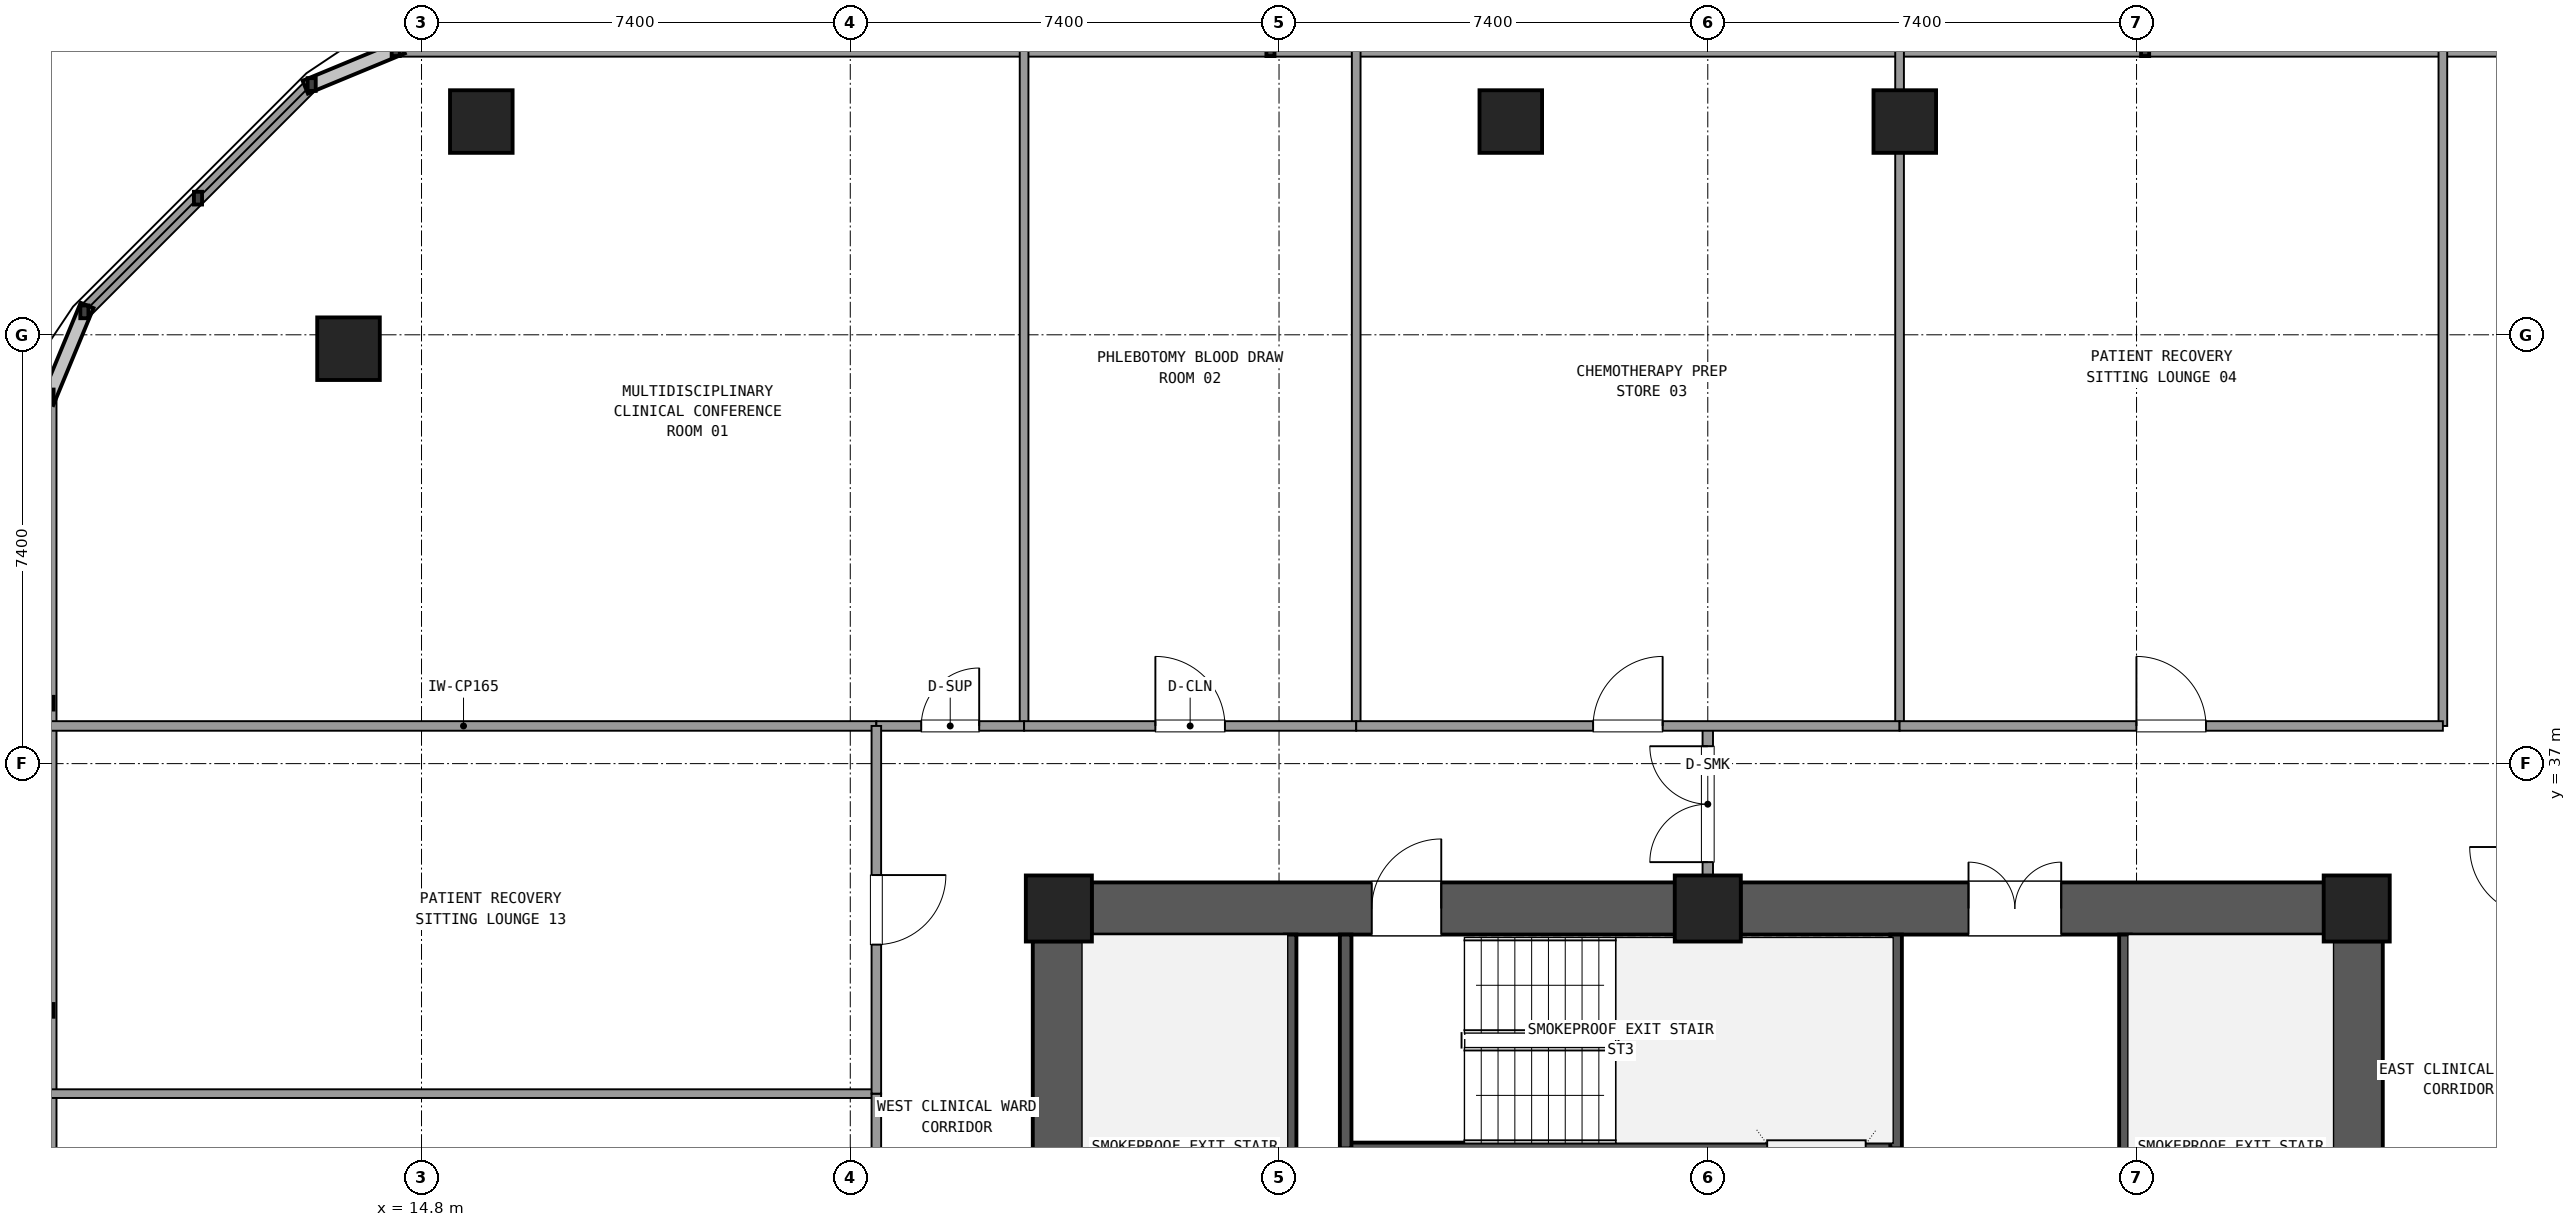
"""IFC4 building model, lengths in metres.
Left out: names, types, materials, properties, quantities, classifications, styles, units other than length and angle.
Written with IfcOpenShell. Run it as: python <this file> out.ifc"""

import sys

from ifc_helpers import new_model, si_unit, direction, frame, frame_2d, origin, origin_2d, place, context, subcontext, project, spatial, rectangle, extrude, element, fill, save


model = new_model("IFC4")
c1 = context("Model", 3, precision=1e-05, world=origin(), true_north=direction((0.0, 1.0)))
c2 = subcontext(c1, "Body", "Model", "MODEL_VIEW")
j1 = project(units=[si_unit("LENGTHUNIT", "METRE"), si_unit("PLANEANGLEUNIT", "RADIAN")], contexts=[c1])
p1 = place(None, origin())
s1 = spatial("IfcSite", under=j1, at=p1, CompositionType="ELEMENT")
p2 = place(p1, origin())
s2 = spatial("IfcBuilding", under=s1, at=p2, CompositionType="ELEMENT")
p3 = place(p2, frame((0.0, 0.0, 56.34)))
s3 = spatial("IfcBuildingStorey", under=s2, at=p3, CompositionType="ELEMENT", Elevation=56.34)
for number, where, z_axis, x_axis in (
    (1, (48.2, 34.5, 0.0), (0.0, 0.0, 1.0), (1.0, 0.0, 0.0)),
    (2, (37.0, 34.5, 0.0), (0.0, 0.0, 1.0), (1.0, 0.0, 0.0)),
    (3, (25.8, 34.5, 0.0), (0.0, 0.0, 1.0), (1.0, 0.0, 0.0)),
):
    element("IfcColumn", number, at=place(p3, frame(where, z_axis=z_axis, x_axis=x_axis)), inside=s3, PredefinedType="COLUMN", context=c2, shape_type="SweptSolid", body=[
        extrude(rectangle(XDim=1.14, YDim=1.14, at=origin_2d()), origin(), (0.0, 0.0, 1.0), 3.6),
    ])
p4 = place(p3, frame((48.2, 26.465, 0.0), z_axis=(0.0, 0.0, 1.0), x_axis=(0.0, 1.0, 0.0)))
e4 = element("IfcWall", 4, at=p4, inside=s3, PredefinedType="SHEAR", context=c2, shape_type="SweptSolid", body=[
    extrude(rectangle(XDim=7.47, YDim=0.9, at=frame_2d((3.735, 0.0))), origin(), (0.0, 0.0, 1.0), 3.32),
])
p5 = place(p3, frame((47.635, 34.5, 0.0), z_axis=(0.0, 0.0, 1.0), x_axis=(-1.0, 0.0, 0.0)))
e5 = element("IfcWall", 5, at=p5, inside=s3, PredefinedType="SHEAR", context=c2, shape_type="SweptSolid", body=[
    extrude(rectangle(XDim=10.07, YDim=0.9, at=frame_2d((5.035, 0.0))), origin(), (0.0, 0.0, 1.0), 3.32),
])
p6 = place(p5, frame((4.535, 0.0, 0.0)))
e6 = element("IfcOpeningElement", 6, at=p6, cuts=e5, PredefinedType="OPENING", context=c2, shape_type="SweptSolid", body=[
    extrude(rectangle(XDim=1.6, YDim=2.2, at=frame_2d((0.8, 1.1))), frame((0.0, 0.46, 0.0), z_axis=(0.0, -1.0, 0.0), x_axis=(1.0, 0.0, 0.0)), (0.0, 0.0, 1.0), 0.92),
])
p7 = place(p3, frame((36.435, 34.5, 0.0), z_axis=(0.0, 0.0, 1.0), x_axis=(-1.0, 0.0, 0.0)))
e7 = element("IfcWall", 7, at=p7, inside=s3, PredefinedType="SHEAR", context=c2, shape_type="SweptSolid", body=[
    extrude(rectangle(XDim=10.07, YDim=0.9, at=frame_2d((5.035, 0.0))), origin(), (0.0, 0.0, 1.0), 3.32),
])
p8 = place(p7, frame((4.035, 0.0, 0.0)))
e8 = element("IfcOpeningElement", 8, at=p8, cuts=e7, PredefinedType="OPENING", context=c2, shape_type="SweptSolid", body=[
    extrude(rectangle(XDim=1.2, YDim=2.15, at=frame_2d((0.6, 1.075))), frame((0.0, 0.46, 0.0), z_axis=(0.0, -1.0, 0.0), x_axis=(1.0, 0.0, 0.0)), (0.0, 0.0, 1.0), 0.92),
])
p9 = place(p3, frame((25.8, 33.935, 0.0), z_axis=(0.0, 0.0, 1.0), x_axis=(0.0, -1.0, 0.0)))
e9 = element("IfcWall", 9, at=p9, inside=s3, PredefinedType="SHEAR", context=c2, shape_type="SweptSolid", body=[
    extrude(rectangle(XDim=7.47, YDim=0.9, at=frame_2d((3.735, 0.0))), origin(), (0.0, 0.0, 1.0), 3.32),
])
for number, where, z_axis, x_axis in (
    (10, (40.4, 48.08, 0.0), (0.0, 0.0, 1.0), (1.0, 0.0, 0.0)),
    (11, (33.6, 48.08, 0.0), (0.0, 0.0, 1.0), (1.0, 0.0, 0.0)),
    (12, (15.832, 48.08, 0.0), (0.0, 0.0, 1.0), (1.0, 0.0, 0.0)),
    (13, (13.54, 44.16, 0.0), (0.0, 0.0, 1.0), (1.0, 0.0, 0.0)),
):
    element("IfcColumn", number, at=place(p3, frame(where, z_axis=z_axis, x_axis=x_axis)), inside=s3, PredefinedType="COLUMN", context=c2, shape_type="SweptSolid", body=[
        extrude(rectangle(XDim=1.08, YDim=1.08, at=origin_2d()), origin(), (0.0, 0.0, 1.0), 3.6),
    ])
p10 = place(p3, frame((59.645, 49.32, 0.0), z_axis=(0.0, 0.0, 1.0), x_axis=(-1.0, 0.0, 0.0)))
e14 = element("IfcWall", 14, at=p10, inside=s3, PredefinedType="SOLIDWALL", context=c2, shape_type="SweptSolid", body=[
    extrude(rectangle(XDim=45.29, YDim=0.24, at=frame_2d((22.645, 0.0))), origin(), (0.0, 0.0, 1.0), 0.85),
])
p11 = place(p3, frame((12.904, 48.719, 0.0), z_axis=(0.0, 0.0, 1.0), x_axis=(-0.707106781187, -0.707106781187, 0.0)))
e15 = element("IfcWall", 15, at=p11, inside=s3, PredefinedType="SOLIDWALL", context=c2, shape_type="SweptSolid", body=[
    extrude(rectangle(XDim=5.548, YDim=0.24, at=frame_2d((2.774, 0.0))), origin(), (0.0, 0.0, 1.0), 0.85),
])
p12 = place(p3, frame((8.38, 43.345, 0.0), z_axis=(0.0, 0.0, 1.0), x_axis=(0.0, -1.0, 0.0)))
e16 = element("IfcWall", 16, at=p12, inside=s3, PredefinedType="SOLIDWALL", context=c2, shape_type="SweptSolid", body=[
    extrude(rectangle(XDim=15.905, YDim=0.24, at=frame_2d((7.953, 0.0))), origin(), (0.0, 0.0, 1.0), 0.85),
])
for number, where, z_axis, x_axis in (
    (17, (29.8, 24.65, 0.0), (0.0, 0.0, 1.0), (0.0, 1.0, 0.0)),
    (18, (44.2, 24.65, 0.0), (0.0, 0.0, 1.0), (0.0, 1.0, 0.0)),
):
    element("IfcWall", number, at=place(p3, frame(where, z_axis=z_axis, x_axis=x_axis)), inside=s3, PredefinedType="SHEAR", context=c2, shape_type="SweptSolid", body=[
        extrude(rectangle(XDim=9.4, YDim=0.2, at=frame_2d((4.7, 0.0))), origin(), (0.0, 0.0, 1.0), 3.32),
    ])
p13 = place(p3, frame((30.75, 30.36, 0.0), z_axis=(0.0, 0.0, 1.0), x_axis=(1.0, 0.0, 0.0)))
e19 = element("IfcWall", 19, at=p13, inside=s3, PredefinedType="SHEAR", context=c2, shape_type="SweptSolid", body=[
    extrude(rectangle(XDim=9.5, YDim=0.2, at=frame_2d((4.75, 0.0))), origin(), (0.0, 0.0, 1.0), 3.32),
])
for number, where, z_axis, x_axis in (
    (20, (30.75, 30.36, 0.0), (0.0, 0.0, 1.0), (0.0, 1.0, 0.0)),
    (21, (40.25, 30.36, 0.0), (0.0, 0.0, 1.0), (0.0, 1.0, 0.0)),
):
    element("IfcWall", number, at=place(p3, frame(where, z_axis=z_axis, x_axis=x_axis)), inside=s3, PredefinedType="SHEAR", context=c2, shape_type="SweptSolid", body=[
        extrude(rectangle(XDim=3.69, YDim=0.2, at=frame_2d((1.845, 0.0))), origin(), (0.0, 0.0, 1.0), 3.32),
    ])
p14 = place(p3, frame((37.0, 34.95, 0.0), z_axis=(0.0, 0.0, 1.0), x_axis=(0.0, 1.0, 0.0)))
e22 = element("IfcWall", 22, at=p14, inside=s3, PredefinedType="PARTITIONING", context=c2, shape_type="SweptSolid", body=[
    extrude(rectangle(XDim=2.7, YDim=0.18, at=frame_2d((1.35, 0.0))), origin(), (0.0, 0.0, 1.0), 2.61),
])
p15 = place(p14, frame((0.35, 0.0, 0.0)))
e23 = element("IfcOpeningElement", 23, at=p15, cuts=e22, PredefinedType="OPENING", context=c2, shape_type="SweptSolid", body=[
    extrude(rectangle(XDim=2.0, YDim=2.2, at=frame_2d((1.0, 1.1))), frame((0.0, 0.1, 0.0), z_axis=(0.0, -1.0, 0.0), x_axis=(1.0, 0.0, 0.0)), (0.0, 0.0, 1.0), 0.2),
])
p16 = place(p3, frame((8.4, 37.65, 0.0), z_axis=(0.0, 0.0, 1.0), x_axis=(1.0, 0.0, 0.0)))
e24 = element("IfcWall", 24, at=p16, inside=s3, PredefinedType="PARTITIONING", context=c2, shape_type="SweptSolid", body=[
    extrude(rectangle(XDim=14.25, YDim=0.165, at=frame_2d((7.125, 0.0))), origin(), (0.0, 0.0, 1.0), 2.61),
])
p17 = place(p3, frame((25.2, 37.65, 0.0), z_axis=(0.0, 0.0, 1.0), x_axis=(0.0, 1.0, 0.0)))
e25 = element("IfcWall", 25, at=p17, inside=s3, PredefinedType="PARTITIONING", context=c2, shape_type="SweptSolid", body=[
    extrude(rectangle(XDim=11.65, YDim=0.15, at=frame_2d((5.825, 0.0))), origin(), (0.0, 0.0, 1.0), 2.61),
])
p18 = place(p3, frame((22.65, 37.65, 0.0), z_axis=(0.0, 0.0, 1.0), x_axis=(1.0, 0.0, 0.0)))
e26 = element("IfcWall", 26, at=p18, inside=s3, PredefinedType="PARTITIONING", context=c2, shape_type="SweptSolid", body=[
    extrude(rectangle(XDim=2.55, YDim=0.165, at=frame_2d((1.275, 0.0))), origin(), (0.0, 0.0, 1.0), 2.61),
])
p19 = place(p18, frame((0.775, 0.0, 0.0)))
e27 = element("IfcOpeningElement", 27, at=p19, cuts=e26, PredefinedType="OPENING", context=c2, shape_type="SweptSolid", body=[
    extrude(rectangle(XDim=1.0, YDim=2.15, at=frame_2d((0.5, 1.075))), frame((0.0, 0.093, 0.0), z_axis=(0.0, -1.0, 0.0), x_axis=(1.0, 0.0, 0.0)), (0.0, 0.0, 1.0), 0.185),
])
p20 = place(p3, frame((30.932, 37.65, 0.0), z_axis=(0.0, 0.0, 1.0), x_axis=(0.0, 1.0, 0.0)))
e28 = element("IfcWall", 28, at=p20, inside=s3, PredefinedType="PARTITIONING", context=c2, shape_type="SweptSolid", body=[
    extrude(rectangle(XDim=11.65, YDim=0.15, at=frame_2d((5.825, 0.0))), origin(), (0.0, 0.0, 1.0), 2.61),
])
p21 = place(p3, frame((25.2, 37.65, 0.0), z_axis=(0.0, 0.0, 1.0), x_axis=(1.0, 0.0, 0.0)))
e29 = element("IfcWall", 29, at=p21, inside=s3, PredefinedType="PARTITIONING", context=c2, shape_type="SweptSolid", body=[
    extrude(rectangle(XDim=5.732, YDim=0.165, at=frame_2d((2.866, 0.0))), origin(), (0.0, 0.0, 1.0), 2.61),
])
p22 = place(p21, frame((2.266, 0.0, 0.0)))
e30 = element("IfcOpeningElement", 30, at=p22, cuts=e29, PredefinedType="OPENING", context=c2, shape_type="SweptSolid", body=[
    extrude(rectangle(XDim=1.2, YDim=2.15, at=frame_2d((0.6, 1.075))), frame((0.0, 0.093, 0.0), z_axis=(0.0, -1.0, 0.0), x_axis=(1.0, 0.0, 0.0)), (0.0, 0.0, 1.0), 0.185),
])
p23 = place(p3, frame((40.31, 37.65, 0.0), z_axis=(0.0, 0.0, 1.0), x_axis=(0.0, 1.0, 0.0)))
e31 = element("IfcWall", 31, at=p23, inside=s3, PredefinedType="PARTITIONING", context=c2, shape_type="SweptSolid", body=[
    extrude(rectangle(XDim=11.65, YDim=0.15, at=frame_2d((5.825, 0.0))), origin(), (0.0, 0.0, 1.0), 2.61),
])
p24 = place(p3, frame((30.932, 37.65, 0.0), z_axis=(0.0, 0.0, 1.0), x_axis=(1.0, 0.0, 0.0)))
e32 = element("IfcWall", 32, at=p24, inside=s3, PredefinedType="PARTITIONING", context=c2, shape_type="SweptSolid", body=[
    extrude(rectangle(XDim=9.378, YDim=0.165, at=frame_2d((4.689, 0.0))), origin(), (0.0, 0.0, 1.0), 2.61),
])
p25 = place(p24, frame((4.089, 0.0, 0.0)))
e33 = element("IfcOpeningElement", 33, at=p25, cuts=e32, PredefinedType="OPENING", context=c2, shape_type="SweptSolid", body=[
    extrude(rectangle(XDim=1.2, YDim=2.15, at=frame_2d((0.6, 1.075))), frame((0.0, 0.093, 0.0), z_axis=(0.0, -1.0, 0.0), x_axis=(1.0, 0.0, 0.0)), (0.0, 0.0, 1.0), 0.185),
])
p26 = place(p3, frame((49.687, 37.65, 0.0), z_axis=(0.0, 0.0, 1.0), x_axis=(0.0, 1.0, 0.0)))
e34 = element("IfcWall", 34, at=p26, inside=s3, PredefinedType="PARTITIONING", context=c2, shape_type="SweptSolid", body=[
    extrude(rectangle(XDim=11.65, YDim=0.15, at=frame_2d((5.825, 0.0))), origin(), (0.0, 0.0, 1.0), 2.61),
])
p27 = place(p3, frame((40.31, 37.65, 0.0), z_axis=(0.0, 0.0, 1.0), x_axis=(1.0, 0.0, 0.0)))
e35 = element("IfcWall", 35, at=p27, inside=s3, PredefinedType="PARTITIONING", context=c2, shape_type="SweptSolid", body=[
    extrude(rectangle(XDim=9.377, YDim=0.165, at=frame_2d((4.688, 0.0))), origin(), (0.0, 0.0, 1.0), 2.61),
])
p28 = place(p27, frame((4.088, 0.0, 0.0)))
e36 = element("IfcOpeningElement", 36, at=p28, cuts=e35, PredefinedType="OPENING", context=c2, shape_type="SweptSolid", body=[
    extrude(rectangle(XDim=1.2, YDim=2.15, at=frame_2d((0.6, 1.075))), frame((0.0, 0.093, 0.0), z_axis=(0.0, -1.0, 0.0), x_axis=(1.0, 0.0, 0.0)), (0.0, 0.0, 1.0), 0.185),
])
p29 = place(p3, frame((22.65, 31.305, 0.0), z_axis=(0.0, 0.0, 1.0), x_axis=(-1.0, 0.0, 0.0)))
e37 = element("IfcWall", 37, at=p29, inside=s3, PredefinedType="PARTITIONING", context=c2, shape_type="SweptSolid", body=[
    extrude(rectangle(XDim=14.25, YDim=0.15, at=frame_2d((7.125, 0.0))), origin(), (0.0, 0.0, 1.0), 2.61),
])
p30 = place(p3, frame((22.65, 23.315, 0.0), z_axis=(0.0, 0.0, 1.0), x_axis=(0.0, 1.0, 0.0)))
e38 = element("IfcWall", 38, at=p30, inside=s3, PredefinedType="PARTITIONING", context=c2, shape_type="SweptSolid", body=[
    extrude(rectangle(XDim=7.99, YDim=0.165, at=frame_2d((3.995, 0.0))), origin(), (0.0, 0.0, 1.0), 2.61),
])
p31 = place(p30, frame((3.395, 0.0, 0.0)))
e39 = element("IfcOpeningElement", 39, at=p31, cuts=e38, PredefinedType="OPENING", context=c2, shape_type="SweptSolid", body=[
    extrude(rectangle(XDim=1.2, YDim=2.15, at=frame_2d((0.6, 1.075))), frame((0.0, 0.093, 0.0), z_axis=(0.0, -1.0, 0.0), x_axis=(1.0, 0.0, 0.0)), (0.0, 0.0, 1.0), 0.185),
])
p32 = place(p3, frame((22.65, 31.305, 0.0), z_axis=(0.0, 0.0, 1.0), x_axis=(0.0, 1.0, 0.0)))
e40 = element("IfcWall", 40, at=p32, inside=s3, PredefinedType="PARTITIONING", context=c2, shape_type="SweptSolid", body=[
    extrude(rectangle(XDim=6.345, YDim=0.165, at=frame_2d((3.172, 0.0))), origin(), (0.0, 0.0, 1.0), 2.61),
])
p33 = place(p32, frame((2.572, 0.0, 0.0)))
e41 = element("IfcOpeningElement", 41, at=p33, cuts=e40, PredefinedType="OPENING", context=c2, shape_type="SweptSolid", body=[
    extrude(rectangle(XDim=1.2, YDim=2.15, at=frame_2d((0.6, 1.075))), frame((0.0, 0.093, 0.0), z_axis=(0.0, -1.0, 0.0), x_axis=(1.0, 0.0, 0.0)), (0.0, 0.0, 1.0), 0.185),
])
p34 = place(p6, frame((1.6, 0.0, 0.0), z_axis=(0.0, 0.0, 1.0), x_axis=(-1.0, 0.0, 0.0)))
e42 = element("IfcDoor", 42, at=p34, inside=s3, OperationType="DOUBLE_DOOR_SINGLE_SWING", PredefinedType="DOOR", context=c2, shape_type="SweptSolid", body=[
    extrude(rectangle(XDim=1.6, YDim=2.2, at=frame_2d((0.8, 1.1))), frame((0.0, 0.025, 0.0), z_axis=(0.0, -1.0, 0.0), x_axis=(1.0, 0.0, 0.0)), (0.0, 0.0, 1.0), 0.05),
])
fill(e6, e42)
p35 = place(p8, frame((1.2, 0.0, 0.0), z_axis=(0.0, 0.0, 1.0), x_axis=(-1.0, 0.0, 0.0)))
e43 = element("IfcDoor", 43, at=p35, inside=s3, OperationType="SINGLE_SWING_LEFT", PredefinedType="DOOR", context=c2, shape_type="SweptSolid", body=[
    extrude(rectangle(XDim=1.2, YDim=2.15, at=frame_2d((0.6, 1.075))), frame((0.0, 0.025, 0.0), z_axis=(0.0, -1.0, 0.0), x_axis=(1.0, 0.0, 0.0)), (0.0, 0.0, 1.0), 0.05),
])
fill(e8, e43)
p36 = place(p15, origin())
e44 = element("IfcDoor", 44, at=p36, inside=s3, OperationType="DOUBLE_DOOR_SINGLE_SWING", PredefinedType="DOOR", context=c2, shape_type="SweptSolid", body=[
    extrude(rectangle(XDim=2.0, YDim=2.2, at=frame_2d((1.0, 1.1))), frame((0.0, 0.025, 0.0), z_axis=(0.0, -1.0, 0.0), x_axis=(1.0, 0.0, 0.0)), (0.0, 0.0, 1.0), 0.05),
])
fill(e23, e44)
p37 = place(p19, origin())
e45 = element("IfcDoor", 45, at=p37, inside=s3, OperationType="SINGLE_SWING_RIGHT", PredefinedType="DOOR", context=c2, shape_type="SweptSolid", body=[
    extrude(rectangle(XDim=1.0, YDim=2.15, at=frame_2d((0.5, 1.075))), frame((0.0, 0.025, 0.0), z_axis=(0.0, -1.0, 0.0), x_axis=(1.0, 0.0, 0.0)), (0.0, 0.0, 1.0), 0.05),
])
fill(e27, e45)
p38 = place(p22, origin())
e46 = element("IfcDoor", 46, at=p38, inside=s3, OperationType="SINGLE_SWING_LEFT", PredefinedType="DOOR", context=c2, shape_type="SweptSolid", body=[
    extrude(rectangle(XDim=1.2, YDim=2.15, at=frame_2d((0.6, 1.075))), frame((0.0, 0.025, 0.0), z_axis=(0.0, -1.0, 0.0), x_axis=(1.0, 0.0, 0.0)), (0.0, 0.0, 1.0), 0.05),
])
fill(e30, e46)
p39 = place(p25, origin())
e47 = element("IfcDoor", 47, at=p39, inside=s3, OperationType="SINGLE_SWING_RIGHT", PredefinedType="DOOR", context=c2, shape_type="SweptSolid", body=[
    extrude(rectangle(XDim=1.2, YDim=2.15, at=frame_2d((0.6, 1.075))), frame((0.0, 0.025, 0.0), z_axis=(0.0, -1.0, 0.0), x_axis=(1.0, 0.0, 0.0)), (0.0, 0.0, 1.0), 0.05),
])
fill(e33, e47)
p40 = place(p28, origin())
e48 = element("IfcDoor", 48, at=p40, inside=s3, OperationType="SINGLE_SWING_LEFT", PredefinedType="DOOR", context=c2, shape_type="SweptSolid", body=[
    extrude(rectangle(XDim=1.2, YDim=2.15, at=frame_2d((0.6, 1.075))), frame((0.0, 0.025, 0.0), z_axis=(0.0, -1.0, 0.0), x_axis=(1.0, 0.0, 0.0)), (0.0, 0.0, 1.0), 0.05),
])
fill(e36, e48)
p41 = place(p33, frame((1.2, 0.0, 0.0), z_axis=(0.0, 0.0, 1.0), x_axis=(-1.0, 0.0, 0.0)))
e49 = element("IfcDoor", 49, at=p41, inside=s3, OperationType="SINGLE_SWING_RIGHT", PredefinedType="DOOR", context=c2, shape_type="SweptSolid", body=[
    extrude(rectangle(XDim=1.2, YDim=2.15, at=frame_2d((0.6, 1.075))), frame((0.0, 0.025, 0.0), z_axis=(0.0, -1.0, 0.0), x_axis=(1.0, 0.0, 0.0)), (0.0, 0.0, 1.0), 0.05),
])
fill(e41, e49)
save(model, sys.argv[1])
